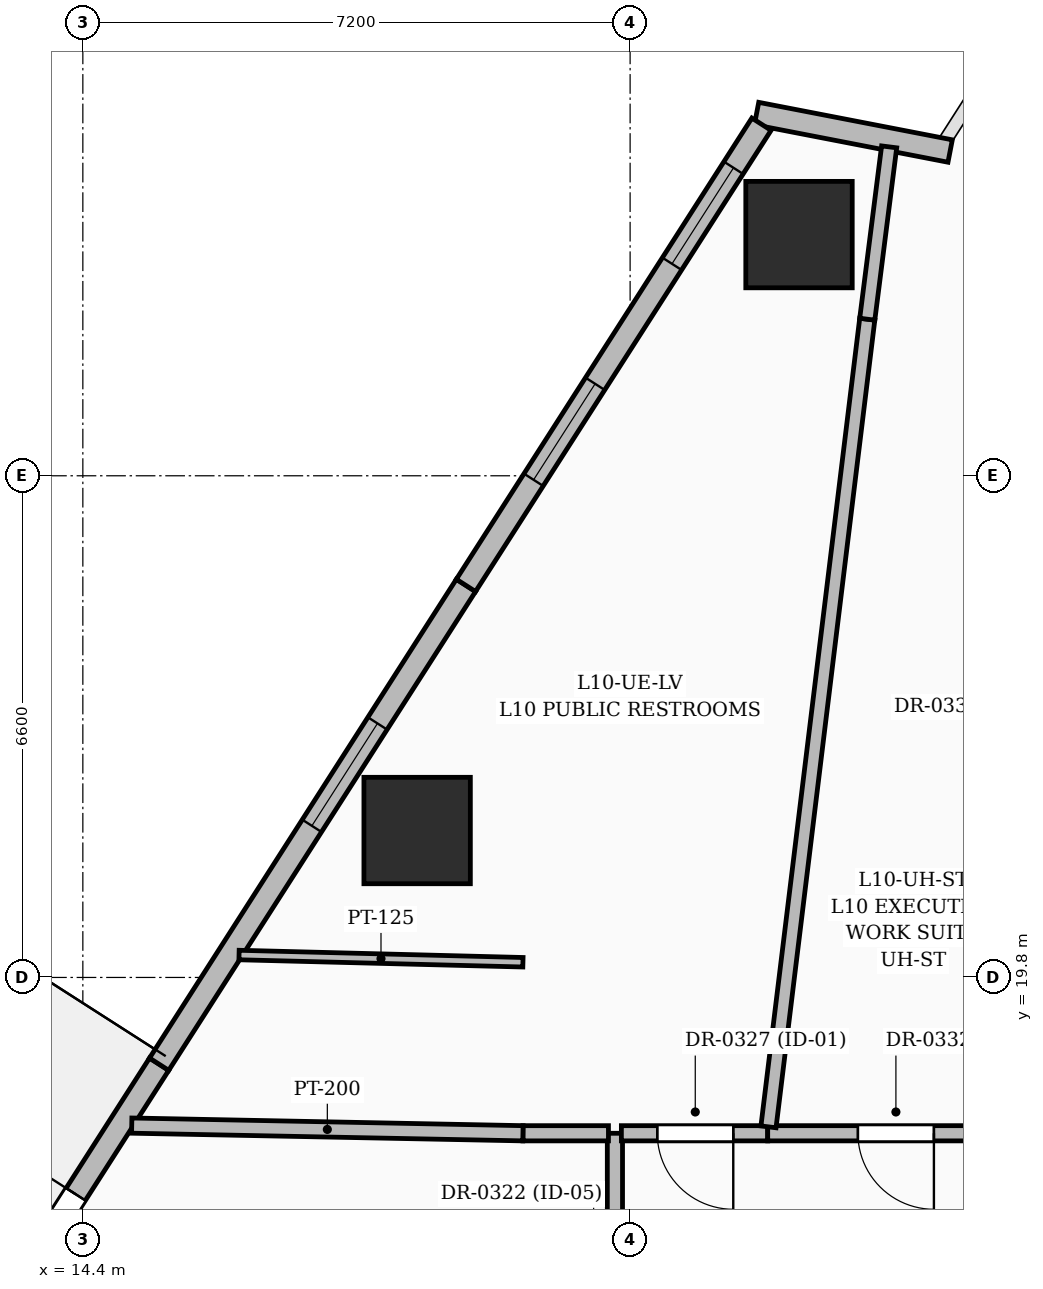
"""IFC4 building model, lengths in metres.
Left out: names, types, materials, properties, quantities, classifications, styles, units other than length and angle.
Written with IfcOpenShell. Run it as: python <this file> out.ifc"""

import sys

from ifc_helpers import new_model, si_unit, direction, frame, frame_2d, origin, origin_2d, place, context, subcontext, project, spatial, rectangle, extrude, element, fill, save


model = new_model("IFC4")
c1 = context("Model", 3, precision=1e-05, world=origin(), true_north=direction((0.0, 1.0)))
c2 = subcontext(c1, "Body", "Model", "MODEL_VIEW")
j1 = project(units=[si_unit("LENGTHUNIT", "METRE"), si_unit("PLANEANGLEUNIT", "RADIAN")], contexts=[c1])
p1 = place(None, origin())
s1 = spatial("IfcSite", under=j1, at=p1, CompositionType="ELEMENT")
p2 = place(p1, origin())
s2 = spatial("IfcBuilding", under=s1, at=p2, CompositionType="ELEMENT")
p3 = place(p2, frame((0.0, 0.0, 46.2)))
s3 = spatial("IfcBuildingStorey", under=s2, at=p3, CompositionType="ELEMENT", Elevation=46.2)
for number, where, z_axis, x_axis in (
    (1, (23.822, 29.573, 0.0), (0.0, 0.0, 1.0), (1.0, 0.0, 0.0)),
    (2, (18.798, 21.733, 0.0), (0.0, 0.0, 1.0), (1.0, 0.0, 0.0)),
):
    element("IfcColumn", number, at=place(p3, frame(where, z_axis=z_axis, x_axis=x_axis)), inside=s3, PredefinedType="COLUMN", context=c2, shape_type="SweptSolid", body=[
        extrude(rectangle(XDim=1.4, YDim=1.4, at=origin_2d()), origin(), (0.0, 0.0, 1.0), 3.6),
    ])
p4 = place(p3, frame((23.264, 31.166, 0.0), z_axis=(0.0, 0.0, 1.0), x_axis=(0.981760587394, -0.190121406053, 0.0)))
e3 = element("IfcWall", 3, at=p4, inside=s3, PredefinedType="SOLIDWALL", context=c2, shape_type="SweptSolid", body=[
    extrude(rectangle(XDim=2.594, YDim=0.3, at=frame_2d((1.297, 0.0))), origin(), (0.0, 0.0, 1.0), 2.375),
])
p5 = place(p3, frame((11.367, 12.359, 0.0), z_axis=(0.0, 0.0, 1.0), x_axis=(0.539548093607, 0.841954781853, 0.0)))
e4 = element("IfcWall", 4, at=p5, inside=s3, PredefinedType="SOLIDWALL", context=c2, shape_type="SweptSolid", body=[
    extrude(rectangle(XDim=7.481, YDim=0.3, at=frame_2d((3.741, 0.0))), origin(), (0.0, 0.0, 1.0), 3.35),
])
p6 = place(p5, frame((4.449, 0.0, 0.0)))
e5 = element("IfcOpeningElement", 5, at=p6, cuts=e4, PredefinedType="OPENING", context=c2, shape_type="SweptSolid", body=[
    extrude(rectangle(XDim=1.0, YDim=2.2, at=frame_2d((0.5, 1.1))), frame((0.0, 0.16, 0.0), z_axis=(0.0, -1.0, 0.0), x_axis=(1.0, 0.0, 0.0)), (0.0, 0.0, 1.0), 0.32),
])
p7 = place(p3, frame((15.404, 18.658, 0.0), z_axis=(0.0, 0.0, 1.0), x_axis=(0.539510136354, 0.841979104712, 0.0)))
e6 = element("IfcWall", 6, at=p7, inside=s3, PredefinedType="SOLIDWALL", context=c2, shape_type="SweptSolid", body=[
    extrude(rectangle(XDim=7.481, YDim=0.3, at=frame_2d((3.741, 0.0))), origin(), (0.0, 0.0, 1.0), 3.35),
])
p8 = place(p7, frame((3.725, 0.0, 0.55)))
e7 = element("IfcOpeningElement", 7, at=p8, cuts=e6, PredefinedType="OPENING", context=c2, shape_type="SweptSolid", body=[
    extrude(rectangle(XDim=1.6, YDim=2.2, at=frame_2d((0.8, 1.1))), frame((0.0, 0.16, 0.0), z_axis=(0.0, -1.0, 0.0), x_axis=(1.0, 0.0, 0.0)), (0.0, 0.0, 1.0), 0.32),
])
p9 = place(p3, frame((19.44, 24.958, 0.0), z_axis=(0.0, 0.0, 1.0), x_axis=(0.539536201693, 0.841962402404, 0.0)))
e8 = element("IfcWall", 8, at=p9, inside=s3, PredefinedType="SOLIDWALL", context=c2, shape_type="SweptSolid", body=[
    extrude(rectangle(XDim=7.207, YDim=0.3, at=frame_2d((3.603, 0.0))), origin(), (0.0, 0.0, 1.0), 3.35),
])
p10 = place(p9, frame((1.65, 0.0, 0.6)))
e9 = element("IfcOpeningElement", 9, at=p10, cuts=e8, PredefinedType="OPENING", context=c2, shape_type="SweptSolid", body=[
    extrude(rectangle(XDim=1.5, YDim=2.1, at=frame_2d((0.75, 1.05))), frame((0.0, 0.16, 0.0), z_axis=(0.0, -1.0, 0.0), x_axis=(1.0, 0.0, 0.0)), (0.0, 0.0, 1.0), 0.32),
])
p11 = place(p9, frame((5.025, 0.0, 0.6)))
e10 = element("IfcOpeningElement", 10, at=p11, cuts=e8, PredefinedType="OPENING", context=c2, shape_type="SweptSolid", body=[
    extrude(rectangle(XDim=1.5, YDim=2.1, at=frame_2d((0.75, 1.05))), frame((0.0, 0.16, 0.0), z_axis=(0.0, -1.0, 0.0), x_axis=(1.0, 0.0, 0.0)), (0.0, 0.0, 1.0), 0.32),
])
p12 = place(p3, frame((21.4, 17.75, 0.0), z_axis=(0.0, 0.0, 1.0), x_axis=(0.0, -1.0, 0.0)))
e11 = element("IfcWall", 11, at=p12, inside=s3, PredefinedType="PARTITIONING", context=c2, shape_type="SweptSolid", body=[
    extrude(rectangle(XDim=5.0, YDim=0.2, at=frame_2d((2.5, 0.0))), origin(), (0.0, 0.0, 1.0), 2.86),
])
p13 = place(p12, frame((1.642, 0.0, 0.0)))
e12 = element("IfcOpeningElement", 12, at=p13, cuts=e11, PredefinedType="OPENING", context=c2, shape_type="SweptSolid", body=[
    extrude(rectangle(XDim=1.6, YDim=2.3, at=frame_2d((0.8, 1.15))), frame((0.0, 0.11, 0.0), z_axis=(0.0, -1.0, 0.0), x_axis=(1.0, 0.0, 0.0)), (0.0, 0.0, 1.0), 0.22),
])
p14 = place(p3, frame((23.41, 17.75, 0.0), z_axis=(0.0, 0.0, 1.0), x_axis=(-1.0, 0.0, 0.0)))
e13 = element("IfcWall", 13, at=p14, inside=s3, PredefinedType="PARTITIONING", context=c2, shape_type="SweptSolid", body=[
    extrude(rectangle(XDim=1.925, YDim=0.2, at=frame_2d((0.962, 0.0))), origin(), (0.0, 0.0, 1.0), 2.279),
])
p15 = place(p14, frame((0.453, 0.0, 0.0)))
e14 = element("IfcOpeningElement", 14, at=p15, cuts=e13, PredefinedType="OPENING", context=c2, shape_type="SweptSolid", body=[
    extrude(rectangle(XDim=1.0, YDim=2.2, at=frame_2d((0.5, 1.1))), frame((0.0, 0.11, 0.0), z_axis=(0.0, -1.0, 0.0), x_axis=(1.0, 0.0, 0.0)), (0.0, 0.0, 1.0), 0.22),
])
p16 = place(p3, frame((26.9, 17.75, 0.0), z_axis=(0.0, 0.0, 1.0), x_axis=(-1.0, 0.0, 0.0)))
e15 = element("IfcWall", 15, at=p16, inside=s3, PredefinedType="PARTITIONING", context=c2, shape_type="SweptSolid", body=[
    extrude(rectangle(XDim=3.49, YDim=0.2, at=frame_2d((1.745, 0.0))), origin(), (0.0, 0.0, 1.0), 2.279),
])
p17 = place(p16, frame((1.303, 0.0, 0.0)))
e16 = element("IfcOpeningElement", 16, at=p17, cuts=e15, PredefinedType="OPENING", context=c2, shape_type="SweptSolid", body=[
    extrude(rectangle(XDim=1.0, YDim=2.2, at=frame_2d((0.5, 1.1))), frame((0.0, 0.11, 0.0), z_axis=(0.0, -1.0, 0.0), x_axis=(1.0, 0.0, 0.0)), (0.0, 0.0, 1.0), 0.22),
])
p18 = place(p3, frame((21.315, 17.75, 0.0), z_axis=(0.0, 0.0, 1.0), x_axis=(-1.0, 0.0, 0.0)))
e17 = element("IfcWall", 17, at=p18, inside=s3, PredefinedType="PARTITIONING", context=c2, shape_type="SweptSolid", body=[
    extrude(rectangle(XDim=1.125, YDim=0.2, at=frame_2d((0.562, 0.0))), origin(), (0.0, 0.0, 1.0), 2.86),
])
p19 = place(p3, frame((20.19, 17.75, 0.0), z_axis=(0.0, 0.0, 1.0), x_axis=(-0.999807237974, 0.019633820156, 0.0)))
e18 = element("IfcWall", 18, at=p19, inside=s3, PredefinedType="PARTITIONING", context=c2, shape_type="SweptSolid", body=[
    extrude(rectangle(XDim=5.148, YDim=0.2, at=frame_2d((2.574, 0.0))), origin(), (0.0, 0.0, 1.0), 2.37),
])
p20 = place(p3, frame((23.42, 17.834, 0.0), z_axis=(0.0, 0.0, 1.0), x_axis=(0.121401324793, 0.992603505101, 0.0)))
e19 = element("IfcWall", 19, at=p20, inside=s3, PredefinedType="PARTITIONING", context=c2, shape_type="SweptSolid", body=[
    extrude(rectangle(XDim=10.705, YDim=0.2, at=frame_2d((5.352, 0.0))), origin(), (0.0, 0.0, 1.0), 2.279),
])
p21 = place(p3, frame((24.72, 28.46, 0.0), z_axis=(0.0, 0.0, 1.0), x_axis=(0.126059314356, 0.992022706022, 0.0)))
e20 = element("IfcWall", 20, at=p21, inside=s3, PredefinedType="PARTITIONING", context=c2, shape_type="SweptSolid", body=[
    extrude(rectangle(XDim=2.285, YDim=0.2, at=frame_2d((1.143, 0.0))), origin(), (0.0, 0.0, 1.0), 2.279),
])
p22 = place(p3, frame((20.19, 20.0, 0.0), z_axis=(0.0, 0.0, 1.0), x_axis=(-0.999676861021, 0.025419943714, 0.0)))
e21 = element("IfcWall", 21, at=p22, inside=s3, PredefinedType="PARTITIONING", context=c2, shape_type="SweptSolid", body=[
    extrude(rectangle(XDim=3.736, YDim=0.125, at=frame_2d((1.868, 0.0))), origin(), (0.0, 0.0, 1.0), 2.37),
])
p23 = place(p6, origin())
e22 = element("IfcDoor", 22, at=p23, inside=s3, OperationType="SINGLE_SWING_RIGHT", PredefinedType="DOOR", context=c2, shape_type="SweptSolid", body=[
    extrude(rectangle(XDim=1.0, YDim=2.2, at=frame_2d((0.5, 1.1))), frame((0.0, 0.025, 0.0), z_axis=(0.0, -1.0, 0.0), x_axis=(1.0, 0.0, 0.0)), (0.0, 0.0, 1.0), 0.05),
])
fill(e5, e22)
p24 = place(p8, origin())
e23 = element("IfcWindow", 23, at=p24, inside=s3, PartitioningType="SINGLE_PANEL", PredefinedType="WINDOW", context=c2, shape_type="SweptSolid", body=[
    extrude(rectangle(XDim=1.6, YDim=2.2, at=frame_2d((0.8, 1.1))), frame((0.0, 0.03, 0.0), z_axis=(0.0, -1.0, 0.0), x_axis=(1.0, 0.0, 0.0)), (0.0, 0.0, 1.0), 0.06),
])
fill(e7, e23)
p25 = place(p10, origin())
e24 = element("IfcWindow", 24, at=p25, inside=s3, PartitioningType="SINGLE_PANEL", PredefinedType="WINDOW", context=c2, shape_type="SweptSolid", body=[
    extrude(rectangle(XDim=1.5, YDim=2.1, at=frame_2d((0.75, 1.05))), frame((0.0, 0.03, 0.0), z_axis=(0.0, -1.0, 0.0), x_axis=(1.0, 0.0, 0.0)), (0.0, 0.0, 1.0), 0.06),
])
fill(e9, e24)
p26 = place(p11, origin())
e25 = element("IfcWindow", 25, at=p26, inside=s3, PartitioningType="SINGLE_PANEL", PredefinedType="WINDOW", context=c2, shape_type="SweptSolid", body=[
    extrude(rectangle(XDim=1.5, YDim=2.1, at=frame_2d((0.75, 1.05))), frame((0.0, 0.03, 0.0), z_axis=(0.0, -1.0, 0.0), x_axis=(1.0, 0.0, 0.0)), (0.0, 0.0, 1.0), 0.06),
])
fill(e10, e25)
p27 = place(p15, origin())
e26 = element("IfcDoor", 26, at=p27, inside=s3, OperationType="SINGLE_SWING_LEFT", PredefinedType="DOOR", context=c2, shape_type="SweptSolid", body=[
    extrude(rectangle(XDim=1.0, YDim=2.2, at=frame_2d((0.5, 1.1))), frame((0.0, 0.025, 0.0), z_axis=(0.0, -1.0, 0.0), x_axis=(1.0, 0.0, 0.0)), (0.0, 0.0, 1.0), 0.05),
])
fill(e14, e26)
p28 = place(p17, origin())
e27 = element("IfcDoor", 27, at=p28, inside=s3, OperationType="SINGLE_SWING_LEFT", PredefinedType="DOOR", context=c2, shape_type="SweptSolid", body=[
    extrude(rectangle(XDim=1.0, YDim=2.2, at=frame_2d((0.5, 1.1))), frame((0.0, 0.025, 0.0), z_axis=(0.0, -1.0, 0.0), x_axis=(1.0, 0.0, 0.0)), (0.0, 0.0, 1.0), 0.05),
])
fill(e16, e27)
save(model, sys.argv[1])
